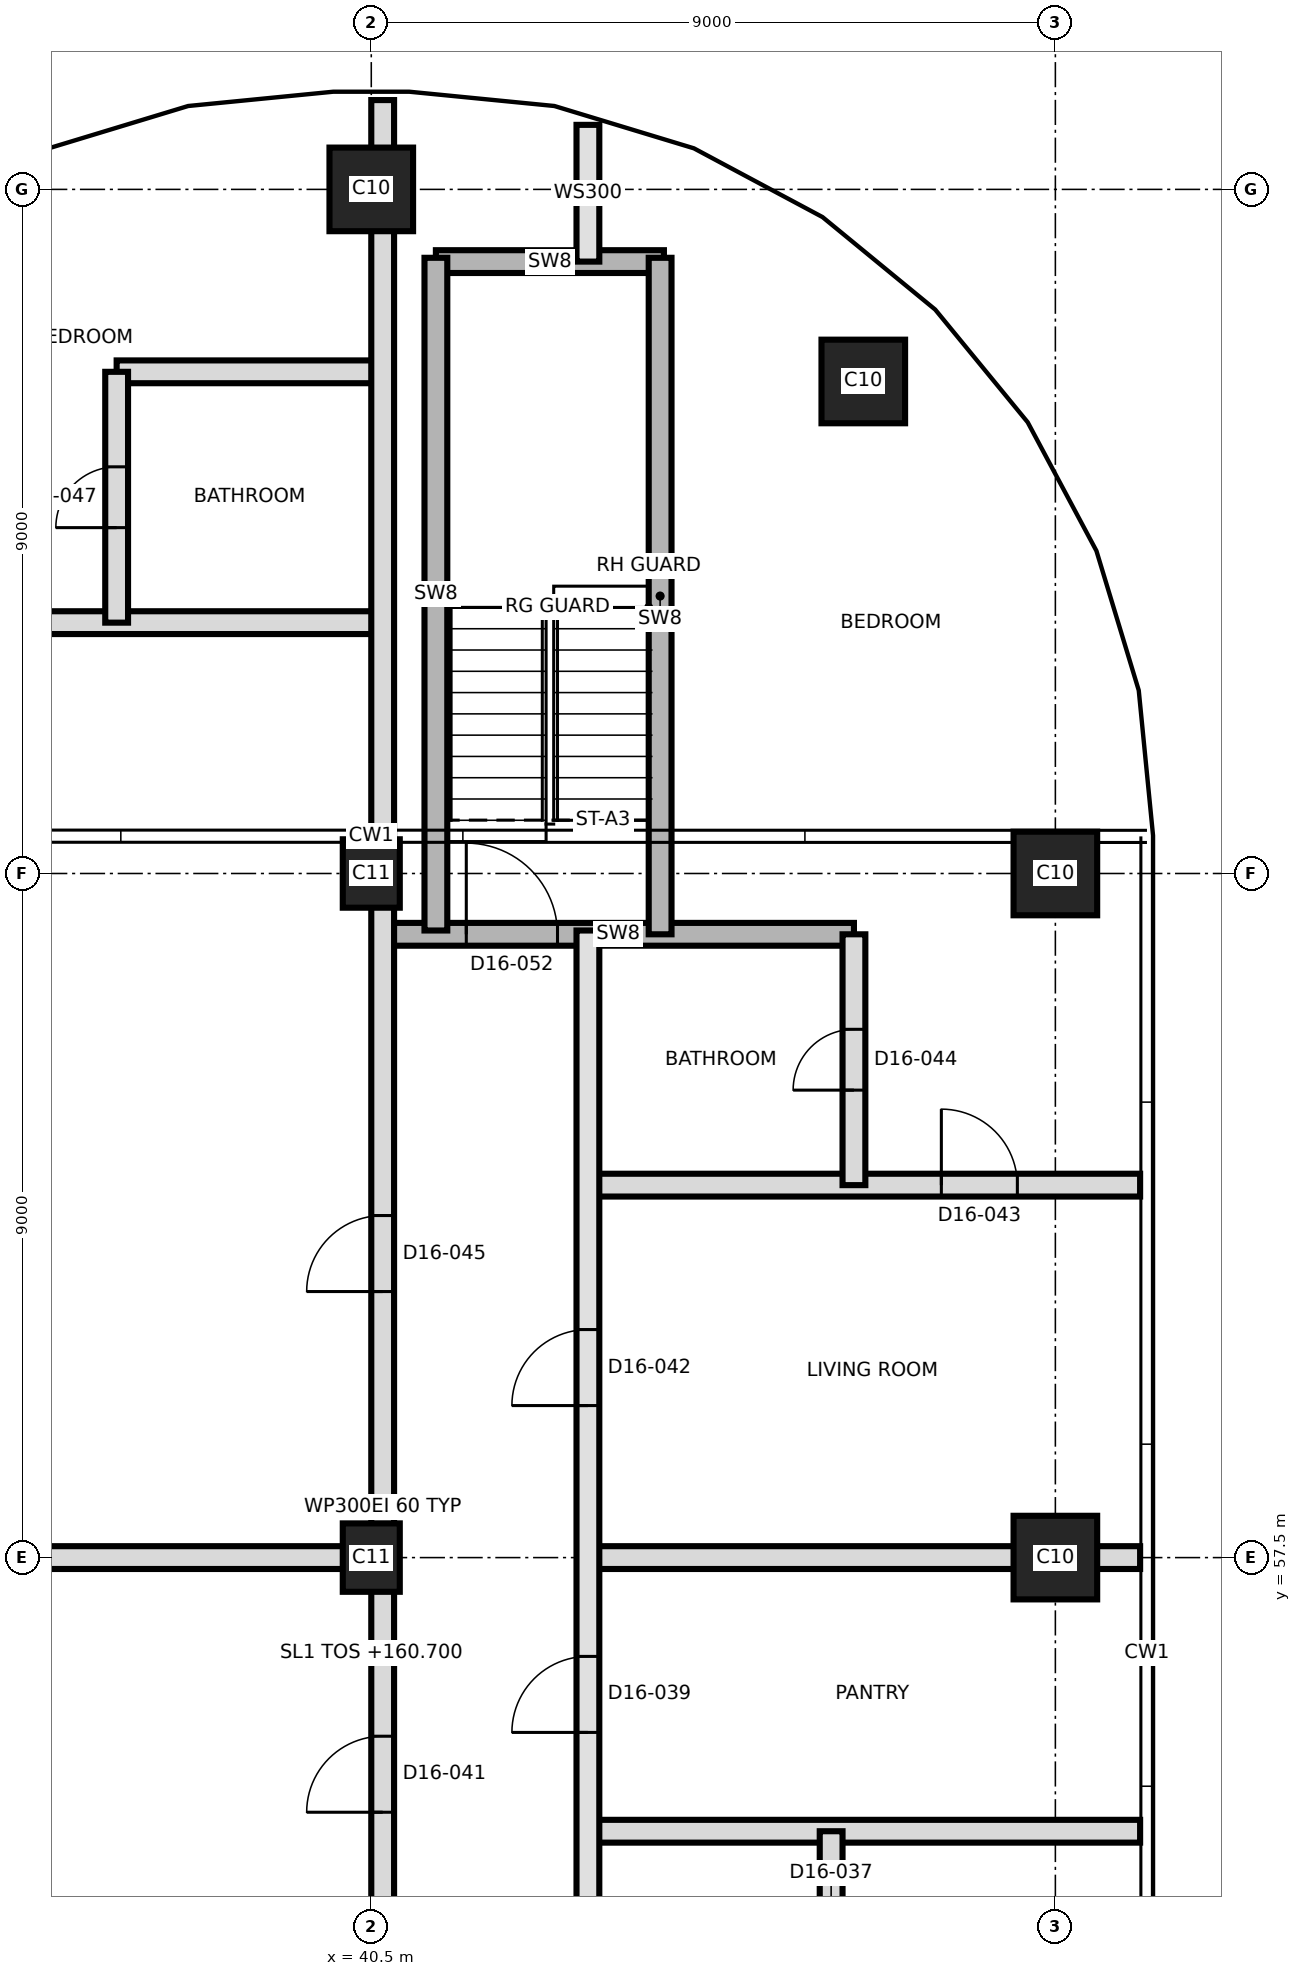
"""IFC4 building model, lengths in metres.
Left out: names, types, materials, properties, quantities, classifications, styles, units other than length and angle.
Written with IfcOpenShell. Run it as: python <this file> out.ifc"""

import sys

from ifc_helpers import new_model, si_unit, direction, frame, frame_2d, origin, origin_2d, place, context, subcontext, project, spatial, rectangle, extrude, element, fill, save


model = new_model("IFC4")
c1 = context("Model", 3, precision=1e-05, world=origin(), true_north=direction((0.0, 1.0)))
c2 = subcontext(c1, "Body", "Model", "MODEL_VIEW")
j1 = project(units=[si_unit("LENGTHUNIT", "METRE"), si_unit("PLANEANGLEUNIT", "RADIAN")], contexts=[c1])
p1 = place(None, origin())
s1 = spatial("IfcSite", under=j1, at=p1, CompositionType="ELEMENT")
p2 = place(p1, origin())
s2 = spatial("IfcBuilding", under=s1, at=p2, CompositionType="ELEMENT")
p3 = place(p2, frame((0.0, 0.0, 160.7)))
s3 = spatial("IfcBuildingStorey", under=s2, at=p3, CompositionType="ELEMENT", Elevation=160.7)
p4 = place(p3, frame((40.5, 57.5, 0.0), z_axis=(0.0, 0.0, 1.0), x_axis=(0.0, 1.0, 0.0)))
e1 = element("IfcColumn", 1, at=p4, inside=s3, PredefinedType="COLUMN", context=c2, shape_type="SweptSolid", body=[
    extrude(rectangle(XDim=0.9, YDim=0.75, at=origin_2d()), origin(), (0.0, 0.0, 1.0), 3.7),
])
p5 = place(p3, frame((49.5, 57.5, 0.0), z_axis=(0.0, 0.0, 1.0), x_axis=(1.0, 0.0, 0.0)))
e2 = element("IfcColumn", 2, at=p5, inside=s3, PredefinedType="COLUMN", context=c2, shape_type="SweptSolid", body=[
    extrude(rectangle(XDim=1.1, YDim=1.1, at=origin_2d()), origin(), (0.0, 0.0, 1.0), 3.7),
])
p6 = place(p3, frame((40.5, 66.5, 0.0), z_axis=(0.0, 0.0, 1.0), x_axis=(0.0, 1.0, 0.0)))
e3 = element("IfcColumn", 3, at=p6, inside=s3, PredefinedType="COLUMN", context=c2, shape_type="SweptSolid", body=[
    extrude(rectangle(XDim=0.9, YDim=0.75, at=origin_2d()), origin(), (0.0, 0.0, 1.0), 3.7),
])
for number, where, z_axis, x_axis in (
    (4, (49.5, 66.5, 0.0), (0.0, 0.0, 1.0), (1.0, 0.0, 0.0)),
    (5, (46.973, 72.973, 0.0), (0.0, 0.0, 1.0), (1.0, 0.0, 0.0)),
    (6, (40.5, 75.5, 0.0), (0.0, 0.0, 1.0), (1.0, 0.0, 0.0)),
):
    element("IfcColumn", number, at=place(p3, frame(where, z_axis=z_axis, x_axis=x_axis)), inside=s3, PredefinedType="COLUMN", context=c2, shape_type="SweptSolid", body=[
        extrude(rectangle(XDim=1.1, YDim=1.1, at=origin_2d()), origin(), (0.0, 0.0, 1.0), 3.7),
    ])
p7 = place(p3, frame((43.35, 53.9, 0.0), z_axis=(0.0, 0.0, 1.0), x_axis=(1.0, 0.0, 0.0)))
e7 = element("IfcWall", 7, at=p7, inside=s3, PredefinedType="PARTITIONING", context=c2, shape_type="SweptSolid", body=[
    extrude(rectangle(XDim=7.265, YDim=0.3, at=frame_2d((3.632, 0.0))), origin(), (0.0, 0.0, 1.0), 3.4),
])
p8 = place(p3, frame((30.565, 57.5, 0.0), z_axis=(0.0, 0.0, 1.0), x_axis=(1.0, 0.0, 0.0)))
e8 = element("IfcWall", 8, at=p8, inside=s3, PredefinedType="PARTITIONING", context=c2, shape_type="SweptSolid", body=[
    extrude(rectangle(XDim=10.085, YDim=0.3, at=frame_2d((5.042, 0.0))), origin(), (0.0, 0.0, 1.0), 3.4),
])
p9 = place(p3, frame((43.35, 57.5, 0.0), z_axis=(0.0, 0.0, 1.0), x_axis=(1.0, 0.0, 0.0)))
e9 = element("IfcWall", 9, at=p9, inside=s3, PredefinedType="PARTITIONING", context=c2, shape_type="SweptSolid", body=[
    extrude(rectangle(XDim=7.265, YDim=0.3, at=frame_2d((3.632, 0.0))), origin(), (0.0, 0.0, 1.0), 3.4),
])
p10 = place(p3, frame((43.35, 62.4, 0.0), z_axis=(0.0, 0.0, 1.0), x_axis=(1.0, 0.0, 0.0)))
e10 = element("IfcWall", 10, at=p10, inside=s3, PredefinedType="PARTITIONING", context=c2, shape_type="SweptSolid", body=[
    extrude(rectangle(XDim=7.265, YDim=0.3, at=frame_2d((3.632, 0.0))), origin(), (0.0, 0.0, 1.0), 3.4),
])
p11 = place(p10, frame((4.65, 0.0, 0.0)))
e11 = element("IfcOpeningElement", 11, at=p11, cuts=e10, PredefinedType="OPENING", context=c2, shape_type="SweptSolid", body=[
    extrude(rectangle(XDim=1.0, YDim=2.1, at=frame_2d((0.5, 1.05))), frame((0.0, 0.16, 0.0), z_axis=(0.0, -1.0, 0.0), x_axis=(1.0, 0.0, 0.0)), (0.0, 0.0, 1.0), 0.32),
])
p12 = place(p3, frame((40.65, 65.7, 0.0), z_axis=(0.0, 0.0, 1.0), x_axis=(1.0, 0.0, 0.0)))
e12 = element("IfcWall", 12, at=p12, inside=s3, PredefinedType="SHEAR", context=c2, shape_type="SweptSolid", body=[
    extrude(rectangle(XDim=6.2, YDim=0.3, at=frame_2d((3.1, 0.0))), origin(), (0.0, 0.0, 1.0), 3.4),
])
p13 = place(p12, frame((1.1, 0.0, 0.0)))
e13 = element("IfcOpeningElement", 13, at=p13, cuts=e12, PredefinedType="OPENING", context=c2, shape_type="SweptSolid", body=[
    extrude(rectangle(XDim=1.2, YDim=2.1, at=frame_2d((0.6, 1.05))), frame((0.0, 0.16, 0.0), z_axis=(0.0, -1.0, 0.0), x_axis=(1.0, 0.0, 0.0)), (0.0, 0.0, 1.0), 0.32),
])
p14 = place(p3, frame((30.788, 69.8, 0.0), z_axis=(0.0, 0.0, 1.0), x_axis=(1.0, 0.0, 0.0)))
e14 = element("IfcWall", 14, at=p14, inside=s3, PredefinedType="PARTITIONING", context=c2, shape_type="SweptSolid", body=[
    extrude(rectangle(XDim=9.862, YDim=0.3, at=frame_2d((4.931, 0.0))), origin(), (0.0, 0.0, 1.0), 3.4),
])
p15 = place(p14, frame((4.212, 0.0, 0.0)))
e15 = element("IfcOpeningElement", 15, at=p15, cuts=e14, PredefinedType="OPENING", context=c2, shape_type="SweptSolid", body=[
    extrude(rectangle(XDim=1.0, YDim=2.1, at=frame_2d((0.5, 1.05))), frame((0.0, 0.16, 0.0), z_axis=(0.0, -1.0, 0.0), x_axis=(1.0, 0.0, 0.0)), (0.0, 0.0, 1.0), 0.32),
])
p16 = place(p3, frame((37.15, 73.1, 0.0), z_axis=(0.0, 0.0, 1.0), x_axis=(1.0, 0.0, 0.0)))
e16 = element("IfcWall", 16, at=p16, inside=s3, PredefinedType="PARTITIONING", context=c2, shape_type="SweptSolid", body=[
    extrude(rectangle(XDim=3.5, YDim=0.3, at=frame_2d((1.75, 0.0))), origin(), (0.0, 0.0, 1.0), 3.4),
])
p17 = place(p3, frame((41.35, 74.55, 0.0), z_axis=(0.0, 0.0, 1.0), x_axis=(1.0, 0.0, 0.0)))
e17 = element("IfcWall", 17, at=p17, inside=s3, PredefinedType="SHEAR", context=c2, shape_type="SweptSolid", body=[
    extrude(rectangle(XDim=3.0, YDim=0.3, at=frame_2d((1.5, 0.0))), origin(), (0.0, 0.0, 1.0), 3.4),
])
p18 = place(p3, frame((37.15, 69.8, 0.0), z_axis=(0.0, 0.0, 1.0), x_axis=(0.0, 1.0, 0.0)))
e18 = element("IfcWall", 18, at=p18, inside=s3, PredefinedType="PARTITIONING", context=c2, shape_type="SweptSolid", body=[
    extrude(rectangle(XDim=3.3, YDim=0.3, at=frame_2d((1.65, 0.0))), origin(), (0.0, 0.0, 1.0), 3.4),
])
p19 = place(p18, frame((1.25, 0.0, 0.0)))
e19 = element("IfcOpeningElement", 19, at=p19, cuts=e18, PredefinedType="OPENING", context=c2, shape_type="SweptSolid", body=[
    extrude(rectangle(XDim=0.8, YDim=2.1, at=frame_2d((0.4, 1.05))), frame((0.0, 0.16, 0.0), z_axis=(0.0, -1.0, 0.0), x_axis=(1.0, 0.0, 0.0)), (0.0, 0.0, 1.0), 0.32),
])
p20 = place(p3, frame((40.65, 39.65, 0.0), z_axis=(0.0, 0.0, 1.0), x_axis=(0.0, 1.0, 0.0)))
e20 = element("IfcWall", 20, at=p20, inside=s3, PredefinedType="PARTITIONING", context=c2, shape_type="SweptSolid", body=[
    extrude(rectangle(XDim=37.025, YDim=0.3, at=frame_2d((18.513, 0.0))), origin(), (0.0, 0.0, 1.0), 3.4),
])
p21 = place(p20, frame((1.0, 0.0, 0.0)))
e21 = element("IfcOpeningElement", 21, at=p21, cuts=e20, PredefinedType="OPENING", context=c2, shape_type="SweptSolid", body=[
    extrude(rectangle(XDim=1.0, YDim=2.1, at=frame_2d((0.5, 1.05))), frame((0.0, 0.16, 0.0), z_axis=(0.0, -1.0, 0.0), x_axis=(1.0, 0.0, 0.0)), (0.0, 0.0, 1.0), 0.32),
])
p22 = place(p20, frame((6.85, 0.0, 0.0)))
e22 = element("IfcOpeningElement", 22, at=p22, cuts=e20, PredefinedType="OPENING", context=c2, shape_type="SweptSolid", body=[
    extrude(rectangle(XDim=1.0, YDim=2.1, at=frame_2d((0.5, 1.05))), frame((0.0, 0.16, 0.0), z_axis=(0.0, -1.0, 0.0), x_axis=(1.0, 0.0, 0.0)), (0.0, 0.0, 1.0), 0.32),
])
p23 = place(p20, frame((14.5, 0.0, 0.0)))
e23 = element("IfcOpeningElement", 23, at=p23, cuts=e20, PredefinedType="OPENING", context=c2, shape_type="SweptSolid", body=[
    extrude(rectangle(XDim=1.0, YDim=2.4, at=frame_2d((0.5, 1.2))), frame((0.0, 0.16, 0.0), z_axis=(0.0, -1.0, 0.0), x_axis=(1.0, 0.0, 0.0)), (0.0, 0.0, 1.0), 0.32),
])
p24 = place(p20, frame((21.35, 0.0, 0.0)))
e24 = element("IfcOpeningElement", 24, at=p24, cuts=e20, PredefinedType="OPENING", context=c2, shape_type="SweptSolid", body=[
    extrude(rectangle(XDim=1.0, YDim=2.4, at=frame_2d((0.5, 1.2))), frame((0.0, 0.16, 0.0), z_axis=(0.0, -1.0, 0.0), x_axis=(1.0, 0.0, 0.0)), (0.0, 0.0, 1.0), 0.32),
])
p25 = place(p3, frame((41.35, 65.75, 0.0), z_axis=(0.0, 0.0, 1.0), x_axis=(0.0, 1.0, 0.0)))
e25 = element("IfcWall", 25, at=p25, inside=s3, PredefinedType="SHEAR", context=c2, shape_type="SweptSolid", body=[
    extrude(rectangle(XDim=8.85, YDim=0.3, at=frame_2d((4.425, 0.0))), origin(), (0.0, 0.0, 1.0), 3.4),
])
p26 = place(p3, frame((43.35, 39.65, 0.0), z_axis=(0.0, 0.0, 1.0), x_axis=(0.0, 1.0, 0.0)))
e26 = element("IfcWall", 26, at=p26, inside=s3, PredefinedType="SOLIDWALL", context=c2, shape_type="SweptSolid", body=[
    extrude(rectangle(XDim=26.1, YDim=0.3, at=frame_2d((13.05, 0.0))), origin(), (0.0, 0.0, 1.0), 3.4),
])
p27 = place(p26, frame((0.985, 0.0, 0.0)))
e27 = element("IfcOpeningElement", 27, at=p27, cuts=e26, PredefinedType="OPENING", context=c2, shape_type="SweptSolid", body=[
    extrude(rectangle(XDim=1.2, YDim=2.1, at=frame_2d((0.6, 1.05))), frame((0.0, 0.16, 0.0), z_axis=(0.0, -1.0, 0.0), x_axis=(1.0, 0.0, 0.0)), (0.0, 0.0, 1.0), 0.32),
])
p28 = place(p26, frame((4.235, 0.0, 0.0)))
e28 = element("IfcOpeningElement", 28, at=p28, cuts=e26, PredefinedType="OPENING", context=c2, shape_type="SweptSolid", body=[
    extrude(rectangle(XDim=1.0, YDim=2.1, at=frame_2d((0.5, 1.05))), frame((0.0, 0.16, 0.0), z_axis=(0.0, -1.0, 0.0), x_axis=(1.0, 0.0, 0.0)), (0.0, 0.0, 1.0), 0.32),
])
p29 = place(p26, frame((9.7, 0.0, 0.0)))
e29 = element("IfcOpeningElement", 29, at=p29, cuts=e26, PredefinedType="OPENING", context=c2, shape_type="SweptSolid", body=[
    extrude(rectangle(XDim=1.0, YDim=2.1, at=frame_2d((0.5, 1.05))), frame((0.0, 0.16, 0.0), z_axis=(0.0, -1.0, 0.0), x_axis=(1.0, 0.0, 0.0)), (0.0, 0.0, 1.0), 0.32),
])
p30 = place(p26, frame((15.55, 0.0, 0.0)))
e30 = element("IfcOpeningElement", 30, at=p30, cuts=e26, PredefinedType="OPENING", context=c2, shape_type="SweptSolid", body=[
    extrude(rectangle(XDim=1.0, YDim=2.1, at=frame_2d((0.5, 1.05))), frame((0.0, 0.16, 0.0), z_axis=(0.0, -1.0, 0.0), x_axis=(1.0, 0.0, 0.0)), (0.0, 0.0, 1.0), 0.32),
])
p31 = place(p26, frame((19.85, 0.0, 0.0)))
e31 = element("IfcOpeningElement", 31, at=p31, cuts=e26, PredefinedType="OPENING", context=c2, shape_type="SweptSolid", body=[
    extrude(rectangle(XDim=1.0, YDim=2.4, at=frame_2d((0.5, 1.2))), frame((0.0, 0.16, 0.0), z_axis=(0.0, -1.0, 0.0), x_axis=(1.0, 0.0, 0.0)), (0.0, 0.0, 1.0), 0.32),
])
p32 = place(p3, frame((43.35, 74.55, 0.0), z_axis=(0.0, 0.0, 1.0), x_axis=(0.0, 1.0, 0.0)))
e32 = element("IfcWall", 32, at=p32, inside=s3, PredefinedType="SOLIDWALL", context=c2, shape_type="SweptSolid", body=[
    extrude(rectangle(XDim=1.799, YDim=0.3, at=frame_2d((0.899, 0.0))), origin(), (0.0, 0.0, 1.0), 3.4),
])
p33 = place(p3, frame((44.3, 65.7, 0.0), z_axis=(0.0, 0.0, 1.0), x_axis=(0.0, 1.0, 0.0)))
e33 = element("IfcWall", 33, at=p33, inside=s3, PredefinedType="SHEAR", context=c2, shape_type="SweptSolid", body=[
    extrude(rectangle(XDim=8.9, YDim=0.3, at=frame_2d((4.45, 0.0))), origin(), (0.0, 0.0, 1.0), 3.4),
])
p34 = place(p3, frame((46.55, 51.2, 0.0), z_axis=(0.0, 0.0, 1.0), x_axis=(0.0, 1.0, 0.0)))
e34 = element("IfcWall", 34, at=p34, inside=s3, PredefinedType="PARTITIONING", context=c2, shape_type="SweptSolid", body=[
    extrude(rectangle(XDim=2.7, YDim=0.3, at=frame_2d((1.35, 0.0))), origin(), (0.0, 0.0, 1.0), 3.4),
])
p35 = place(p34, frame((0.95, 0.0, 0.0)))
e35 = element("IfcOpeningElement", 35, at=p35, cuts=e34, PredefinedType="OPENING", context=c2, shape_type="SweptSolid", body=[
    extrude(rectangle(XDim=0.8, YDim=2.1, at=frame_2d((0.4, 1.05))), frame((0.0, 0.16, 0.0), z_axis=(0.0, -1.0, 0.0), x_axis=(1.0, 0.0, 0.0)), (0.0, 0.0, 1.0), 0.32),
])
p36 = place(p3, frame((46.85, 62.4, 0.0), z_axis=(0.0, 0.0, 1.0), x_axis=(0.0, 1.0, 0.0)))
e36 = element("IfcWall", 36, at=p36, inside=s3, PredefinedType="PARTITIONING", context=c2, shape_type="SweptSolid", body=[
    extrude(rectangle(XDim=3.3, YDim=0.3, at=frame_2d((1.65, 0.0))), origin(), (0.0, 0.0, 1.0), 3.4),
])
p37 = place(p36, frame((1.25, 0.0, 0.0)))
e37 = element("IfcOpeningElement", 37, at=p37, cuts=e36, PredefinedType="OPENING", context=c2, shape_type="SweptSolid", body=[
    extrude(rectangle(XDim=0.8, YDim=2.1, at=frame_2d((0.4, 1.05))), frame((0.0, 0.16, 0.0), z_axis=(0.0, -1.0, 0.0), x_axis=(1.0, 0.0, 0.0)), (0.0, 0.0, 1.0), 0.32),
])
p38 = place(p30, origin())
e38 = element("IfcDoor", 38, at=p38, inside=s3, OperationType="SINGLE_SWING_LEFT", PredefinedType="DOOR", context=c2, shape_type="SweptSolid", body=[
    extrude(rectangle(XDim=1.0, YDim=2.1, at=frame_2d((0.5, 1.05))), frame((0.0, 0.025, 0.0), z_axis=(0.0, -1.0, 0.0), x_axis=(1.0, 0.0, 0.0)), (0.0, 0.0, 1.0), 0.05),
])
fill(e30, e38)
p39 = place(p23, origin())
e39 = element("IfcDoor", 39, at=p39, inside=s3, OperationType="SINGLE_SWING_RIGHT", PredefinedType="DOOR", context=c2, shape_type="SweptSolid", body=[
    extrude(rectangle(XDim=1.0, YDim=2.4, at=frame_2d((0.5, 1.2))), frame((0.0, 0.025, 0.0), z_axis=(0.0, -1.0, 0.0), x_axis=(1.0, 0.0, 0.0)), (0.0, 0.0, 1.0), 0.05),
])
fill(e23, e39)
p40 = place(p31, origin())
e40 = element("IfcDoor", 40, at=p40, inside=s3, OperationType="SINGLE_SWING_LEFT", PredefinedType="DOOR", context=c2, shape_type="SweptSolid", body=[
    extrude(rectangle(XDim=1.0, YDim=2.4, at=frame_2d((0.5, 1.2))), frame((0.0, 0.025, 0.0), z_axis=(0.0, -1.0, 0.0), x_axis=(1.0, 0.0, 0.0)), (0.0, 0.0, 1.0), 0.05),
])
fill(e31, e40)
p41 = place(p11, origin())
e41 = element("IfcDoor", 41, at=p41, inside=s3, OperationType="SINGLE_SWING_RIGHT", PredefinedType="DOOR", context=c2, shape_type="SweptSolid", body=[
    extrude(rectangle(XDim=1.0, YDim=2.1, at=frame_2d((0.5, 1.05))), frame((0.0, 0.025, 0.0), z_axis=(0.0, -1.0, 0.0), x_axis=(1.0, 0.0, 0.0)), (0.0, 0.0, 1.0), 0.05),
])
fill(e11, e41)
p42 = place(p37, origin())
e42 = element("IfcDoor", 42, at=p42, inside=s3, OperationType="SINGLE_SWING_LEFT", PredefinedType="DOOR", context=c2, shape_type="SweptSolid", body=[
    extrude(rectangle(XDim=0.8, YDim=2.1, at=frame_2d((0.4, 1.05))), frame((0.0, 0.025, 0.0), z_axis=(0.0, -1.0, 0.0), x_axis=(1.0, 0.0, 0.0)), (0.0, 0.0, 1.0), 0.05),
])
fill(e37, e42)
p43 = place(p24, origin())
e43 = element("IfcDoor", 43, at=p43, inside=s3, OperationType="SINGLE_SWING_LEFT", PredefinedType="DOOR", context=c2, shape_type="SweptSolid", body=[
    extrude(rectangle(XDim=1.0, YDim=2.4, at=frame_2d((0.5, 1.2))), frame((0.0, 0.025, 0.0), z_axis=(0.0, -1.0, 0.0), x_axis=(1.0, 0.0, 0.0)), (0.0, 0.0, 1.0), 0.05),
])
fill(e24, e43)
p44 = place(p19, origin())
e44 = element("IfcDoor", 44, at=p44, inside=s3, OperationType="SINGLE_SWING_LEFT", PredefinedType="DOOR", context=c2, shape_type="SweptSolid", body=[
    extrude(rectangle(XDim=0.8, YDim=2.1, at=frame_2d((0.4, 1.05))), frame((0.0, 0.025, 0.0), z_axis=(0.0, -1.0, 0.0), x_axis=(1.0, 0.0, 0.0)), (0.0, 0.0, 1.0), 0.05),
])
fill(e19, e44)
p45 = place(p13, origin())
e45 = element("IfcDoor", 45, at=p45, inside=s3, OperationType="SINGLE_SWING_RIGHT", PredefinedType="DOOR", context=c2, shape_type="SweptSolid", body=[
    extrude(rectangle(XDim=1.2, YDim=2.1, at=frame_2d((0.6, 1.05))), frame((0.0, 0.025, 0.0), z_axis=(0.0, -1.0, 0.0), x_axis=(1.0, 0.0, 0.0)), (0.0, 0.0, 1.0), 0.05),
])
fill(e13, e45)
save(model, sys.argv[1])
